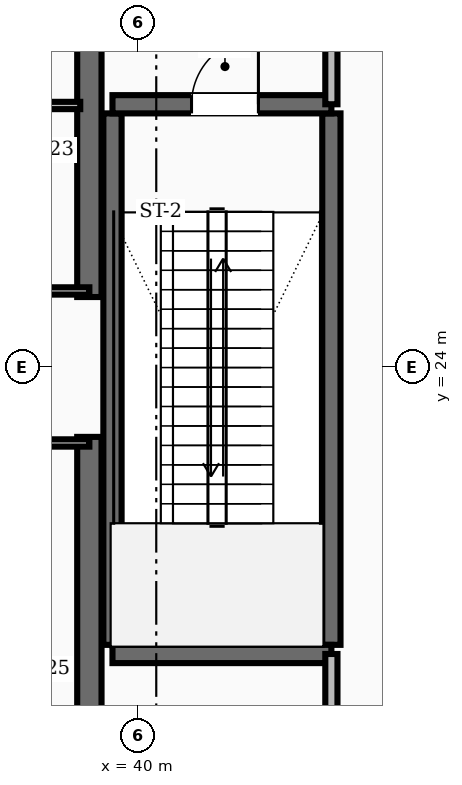
"""IFC4 building model, lengths in metres.
Left out: names, types, materials, properties, quantities, classifications, styles, units other than length and angle.
Written with IfcOpenShell. Run it as: python <this file> out.ifc"""

import sys

from ifc_helpers import new_model, si_unit, direction, frame, frame_2d, origin, place, context, subcontext, project, spatial, rectangle, extrude, element, fill, save


model = new_model("IFC4")
c1 = context("Model", 3, precision=1e-05, world=origin(), true_north=direction((0.0, 1.0)))
c2 = subcontext(c1, "Body", "Model", "MODEL_VIEW")
j1 = project(units=[si_unit("LENGTHUNIT", "METRE"), si_unit("PLANEANGLEUNIT", "RADIAN")], contexts=[c1])
p1 = place(None, origin())
s1 = spatial("IfcSite", under=j1, at=p1, CompositionType="ELEMENT")
p2 = place(p1, origin())
s2 = spatial("IfcBuilding", under=s1, at=p2, CompositionType="ELEMENT")
p3 = place(p2, frame((0.0, 0.0, 24.4)))
s3 = spatial("IfcBuildingStorey", under=s2, at=p3, CompositionType="ELEMENT", Elevation=24.4)
for number, where, z_axis, x_axis in (
    (1, (39.2, 16.55, 0.0), (0.0, 0.0, 1.0), (0.0, 1.0, 0.0)),
    (2, (39.2, 25.15, 0.0), (0.0, 0.0, 1.0), (0.0, 1.0, 0.0)),
):
    element("IfcWall", number, at=place(p3, frame(where, z_axis=z_axis, x_axis=x_axis)), inside=s3, PredefinedType="SHEAR", context=c2, shape_type="SweptSolid", body=[
        extrude(rectangle(XDim=6.3, YDim=0.4, at=frame_2d((3.15, 0.0))), origin(), (0.0, 0.0, 1.0), 6.0),
    ])
for number, where, z_axis, x_axis in (
    (3, (43.18, 19.43, 0.0), (0.0, 0.0, 1.0), (0.0, 1.0, 0.0)),
    (4, (39.58, 19.43, 0.0), (0.0, 0.0, 1.0), (0.0, 1.0, 0.0)),
):
    element("IfcWall", number, at=place(p3, frame(where, z_axis=z_axis, x_axis=x_axis)), inside=s3, PredefinedType="SHEAR", context=c2, shape_type="SweptSolid", body=[
        extrude(rectangle(XDim=8.74, YDim=0.3, at=frame_2d((4.37, 0.0))), origin(), (0.0, 0.0, 1.0), 6.0),
    ])
p4 = place(p3, frame((39.58, 19.28, 0.0), z_axis=(0.0, 0.0, 1.0), x_axis=(1.0, 0.0, 0.0)))
e5 = element("IfcWall", 5, at=p4, inside=s3, PredefinedType="SHEAR", context=c2, shape_type="SweptSolid", body=[
    extrude(rectangle(XDim=3.6, YDim=0.3, at=frame_2d((1.8, 0.0))), origin(), (0.0, 0.0, 1.0), 6.0),
])
p5 = place(p3, frame((39.58, 28.32, 0.0), z_axis=(0.0, 0.0, 1.0), x_axis=(1.0, 0.0, 0.0)))
e6 = element("IfcWall", 6, at=p5, inside=s3, PredefinedType="SHEAR", context=c2, shape_type="SweptSolid", body=[
    extrude(rectangle(XDim=3.6, YDim=0.3, at=frame_2d((1.8, 0.0))), origin(), (0.0, 0.0, 1.0), 6.0),
])
p6 = place(p5, frame((1.3, 0.0, 0.0)))
e7 = element("IfcOpeningElement", 7, at=p6, cuts=e6, PredefinedType="OPENING", context=c2, shape_type="SweptSolid", body=[
    extrude(rectangle(XDim=1.1, YDim=2.1, at=frame_2d((0.55, 1.05))), frame((0.0, 0.16, 0.0), z_axis=(0.0, -1.0, 0.0), x_axis=(1.0, 0.0, 0.0)), (0.0, 0.0, 1.0), 0.32),
])
p7 = place(p3, frame((43.18, 28.32, 0.0), z_axis=(0.0, 0.0, 1.0), x_axis=(0.0, 1.0, 0.0)))
e8 = element("IfcWall", 8, at=p7, inside=s3, PredefinedType="SOLIDWALL", context=c2, shape_type="SweptSolid", body=[
    extrude(rectangle(XDim=3.13, YDim=0.2, at=frame_2d((1.565, 0.0))), origin(), (0.0, 0.0, 1.0), 4.71),
])
p8 = place(p7, frame((1.015, 0.0, 0.0)))
e9 = element("IfcOpeningElement", 9, at=p8, cuts=e8, PredefinedType="OPENING", context=c2, shape_type="SweptSolid", body=[
    extrude(rectangle(XDim=1.1, YDim=2.1, at=frame_2d((0.55, 1.05))), frame((0.0, 0.11, 0.0), z_axis=(0.0, -1.0, 0.0), x_axis=(1.0, 0.0, 0.0)), (0.0, 0.0, 1.0), 0.22),
])
p9 = place(p3, frame((43.18, 16.55, 0.0), z_axis=(0.0, 0.0, 1.0), x_axis=(0.0, 1.0, 0.0)))
e10 = element("IfcWall", 10, at=p9, inside=s3, PredefinedType="SOLIDWALL", context=c2, shape_type="SweptSolid", body=[
    extrude(rectangle(XDim=2.73, YDim=0.2, at=frame_2d((1.365, 0.0))), origin(), (0.0, 0.0, 1.0), 4.71),
])
p10 = place(p9, frame((0.89, 0.0, 0.0)))
e11 = element("IfcOpeningElement", 11, at=p10, cuts=e10, PredefinedType="OPENING", context=c2, shape_type="SweptSolid", body=[
    extrude(rectangle(XDim=0.95, YDim=2.1, at=frame_2d((0.475, 1.05))), frame((0.0, 0.11, 0.0), z_axis=(0.0, -1.0, 0.0), x_axis=(1.0, 0.0, 0.0)), (0.0, 0.0, 1.0), 0.22),
])
for number, where, z_axis, x_axis in (
    (12, (37.4, 25.25, 0.0), (0.0, 0.0, 1.0), (1.0, 0.0, 0.0)),
    (13, (37.4, 22.75, 0.0), (0.0, 0.0, 1.0), (1.0, 0.0, 0.0)),
):
    element("IfcWall", number, at=place(p3, frame(where, z_axis=z_axis, x_axis=x_axis)), inside=s3, PredefinedType="PARTITIONING", context=c2, shape_type="SweptSolid", body=[
        extrude(rectangle(XDim=1.8, YDim=0.12, at=frame_2d((0.9, 0.0))), origin(), (0.0, 0.0, 1.0), 4.71),
    ])
p11 = place(p3, frame((37.4, 28.3, 0.0), z_axis=(0.0, 0.0, 1.0), x_axis=(1.0, 0.0, 0.0)))
e14 = element("IfcWall", 14, at=p11, inside=s3, PredefinedType="PARTITIONING", context=c2, shape_type="SweptSolid", body=[
    extrude(rectangle(XDim=1.65, YDim=0.12, at=frame_2d((0.825, 0.0))), origin(), (0.0, 0.0, 1.0), 4.71),
])
p12 = place(p6, origin())
e15 = element("IfcDoor", 15, at=p12, inside=s3, OperationType="SINGLE_SWING_RIGHT", PredefinedType="DOOR", context=c2, shape_type="SweptSolid", body=[
    extrude(rectangle(XDim=1.1, YDim=2.1, at=frame_2d((0.55, 1.05))), frame((0.0, 0.025, 0.0), z_axis=(0.0, -1.0, 0.0), x_axis=(1.0, 0.0, 0.0)), (0.0, 0.0, 1.0), 0.05),
])
fill(e7, e15)
save(model, sys.argv[1])
